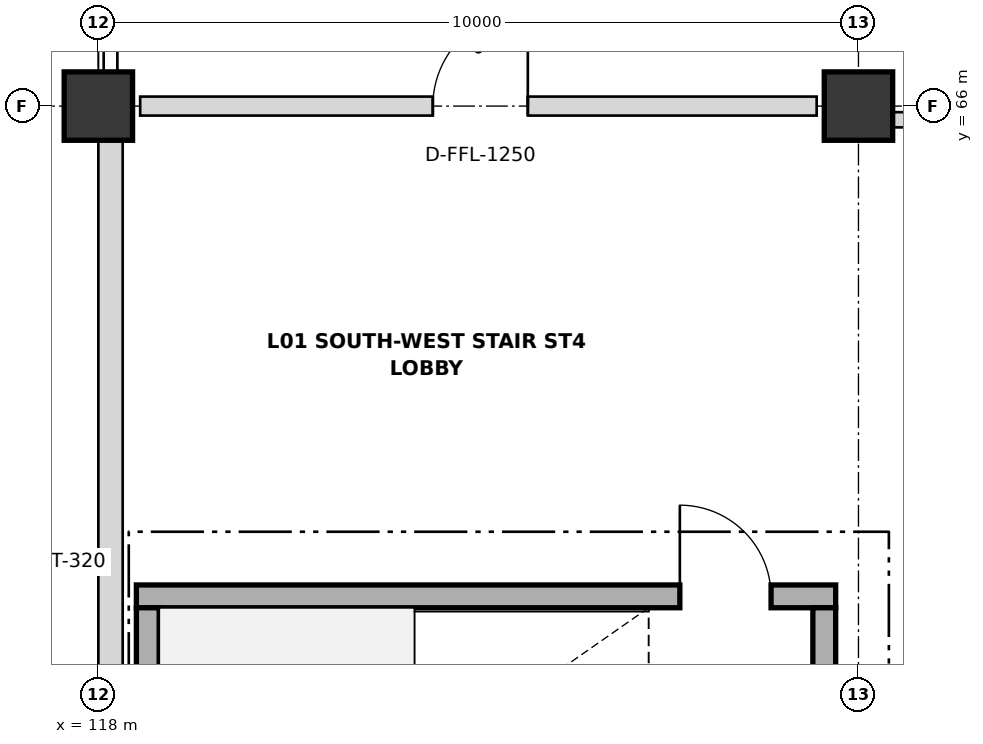
"""IFC4 building model, lengths in metres.
Left out: names, types, materials, properties, quantities, classifications, styles, units other than length and angle.
Written with IfcOpenShell. Run it as: python <this file> out.ifc"""

import sys

from ifc_helpers import new_model, si_unit, direction, frame, frame_2d, origin, origin_2d, place, context, subcontext, project, spatial, rectangle, extrude, element, fill, save


model = new_model("IFC4")
c1 = context("Model", 3, precision=1e-05, world=origin(), true_north=direction((0.0, 1.0)))
c2 = subcontext(c1, "Body", "Model", "MODEL_VIEW")
j1 = project(units=[si_unit("LENGTHUNIT", "METRE"), si_unit("PLANEANGLEUNIT", "RADIAN")], contexts=[c1])
p1 = place(None, origin())
s1 = spatial("IfcSite", under=j1, at=p1, CompositionType="ELEMENT")
p2 = place(p1, origin())
s2 = spatial("IfcBuilding", under=s1, at=p2, CompositionType="ELEMENT")
p3 = place(p2, frame((0.0, 0.0, 5.4)))
s3 = spatial("IfcBuildingStorey", under=s2, at=p3, CompositionType="ELEMENT", Elevation=5.4)
for number, where, z_axis, x_axis in (
    (1, (118.0, 66.0, 0.0), (0.0, 0.0, 1.0), (1.0, 0.0, 0.0)),
    (2, (128.0, 66.0, 0.0), (0.0, 0.0, 1.0), (1.0, 0.0, 0.0)),
):
    element("IfcColumn", number, at=place(p3, frame(where, z_axis=z_axis, x_axis=x_axis)), inside=s3, PredefinedType="COLUMN", context=c2, shape_type="SweptSolid", body=[
        extrude(rectangle(XDim=0.9, YDim=0.9, at=origin_2d()), origin(), (0.0, 0.0, 1.0), 4.2),
    ])
p4 = place(p3, frame((118.16, 54.445, 0.0), z_axis=(0.0, 0.0, 1.0), x_axis=(0.0, 1.0, 0.0)))
e3 = element("IfcWall", 3, at=p4, inside=s3, PredefinedType="SOLIDWALL", context=c2, shape_type="SweptSolid", body=[
    extrude(rectangle(XDim=11.11, YDim=0.32, at=frame_2d((5.555, 0.0))), origin(), (0.0, 0.0, 1.0), 3.218),
])
p5 = place(p3, frame((118.5, 59.55, 0.0), z_axis=(0.0, 0.0, 1.0), x_axis=(1.0, 0.0, 0.0)))
e4 = element("IfcWall", 4, at=p5, inside=s3, PredefinedType="SHEAR", context=c2, shape_type="SweptSolid", body=[
    extrude(rectangle(XDim=9.2, YDim=0.3, at=frame_2d((4.6, 0.0))), origin(), (0.0, 0.0, 1.0), 4.2),
])
p6 = place(p5, frame((7.15, 0.0, 0.0)))
e5 = element("IfcOpeningElement", 5, at=p6, cuts=e4, PredefinedType="OPENING", context=c2, shape_type="SweptSolid", body=[
    extrude(rectangle(XDim=1.2, YDim=2.15, at=frame_2d((0.6, 1.075))), frame((0.0, 0.16, 0.0), z_axis=(0.0, -1.0, 0.0), x_axis=(1.0, 0.0, 0.0)), (0.0, 0.0, 1.0), 0.32),
])
for number, where, z_axis, x_axis in (
    (6, (127.55, 59.4, 0.0), (0.0, 0.0, 1.0), (0.0, -1.0, 0.0)),
    (7, (118.65, 54.9, 0.0), (0.0, 0.0, 1.0), (0.0, 1.0, 0.0)),
):
    element("IfcWall", number, at=place(p3, frame(where, z_axis=z_axis, x_axis=x_axis)), inside=s3, PredefinedType="SHEAR", context=c2, shape_type="SweptSolid", body=[
        extrude(rectangle(XDim=4.5, YDim=0.3, at=frame_2d((2.25, 0.0))), origin(), (0.0, 0.0, 1.0), 4.2),
    ])
p7 = place(p3, frame((118.55, 66.0, 0.0), z_axis=(0.0, 0.0, 1.0), x_axis=(1.0, 0.0, 0.0)))
e8 = element("IfcWall", 8, at=p7, inside=s3, PredefinedType="PARTITIONING", context=c2, shape_type="SweptSolid", body=[
    extrude(rectangle(XDim=8.9, YDim=0.25, at=frame_2d((4.45, 0.0))), origin(), (0.0, 0.0, 1.0), 3.018),
])
p8 = place(p7, frame((3.85, 0.0, 0.0)))
e9 = element("IfcOpeningElement", 9, at=p8, cuts=e8, PredefinedType="OPENING", context=c2, shape_type="SweptSolid", body=[
    extrude(rectangle(XDim=1.25, YDim=2.15, at=frame_2d((0.625, 1.075))), frame((0.0, 0.135, 0.0), z_axis=(0.0, -1.0, 0.0), x_axis=(1.0, 0.0, 0.0)), (0.0, 0.0, 1.0), 0.27),
])
p9 = place(p3, frame((128.3, 65.82, 0.0), z_axis=(0.0, 0.0, 1.0), x_axis=(1.0, 0.0, 0.0)))
e10 = element("IfcWall", 10, at=p9, inside=s3, PredefinedType="PARTITIONING", context=c2, shape_type="SweptSolid", body=[
    extrude(rectangle(XDim=19.4, YDim=0.2, at=frame_2d((9.7, 0.0))), origin(), (0.0, 0.0, 1.0), 3.018),
])
p10 = place(p9, frame((4.175, 0.0, 0.0)))
e11 = element("IfcOpeningElement", 11, at=p10, cuts=e10, PredefinedType="OPENING", context=c2, shape_type="SweptSolid", body=[
    extrude(rectangle(XDim=1.05, YDim=2.1, at=frame_2d((0.525, 1.05))), frame((0.0, 0.11, 0.0), z_axis=(0.0, -1.0, 0.0), x_axis=(1.0, 0.0, 0.0)), (0.0, 0.0, 1.0), 0.22),
])
p11 = place(p6, origin())
e12 = element("IfcDoor", 12, at=p11, inside=s3, OperationType="SINGLE_SWING_LEFT", PredefinedType="DOOR", context=c2, shape_type="SweptSolid", body=[
    extrude(rectangle(XDim=1.2, YDim=2.15, at=frame_2d((0.6, 1.075))), frame((0.0, 0.025, 0.0), z_axis=(0.0, -1.0, 0.0), x_axis=(1.0, 0.0, 0.0)), (0.0, 0.0, 1.0), 0.05),
])
fill(e5, e12)
p12 = place(p8, origin())
e13 = element("IfcDoor", 13, at=p12, inside=s3, OperationType="SINGLE_SWING_RIGHT", PredefinedType="DOOR", context=c2, shape_type="SweptSolid", body=[
    extrude(rectangle(XDim=1.25, YDim=2.15, at=frame_2d((0.625, 1.075))), frame((0.0, 0.025, 0.0), z_axis=(0.0, -1.0, 0.0), x_axis=(1.0, 0.0, 0.0)), (0.0, 0.0, 1.0), 0.05),
])
fill(e9, e13)
save(model, sys.argv[1])
